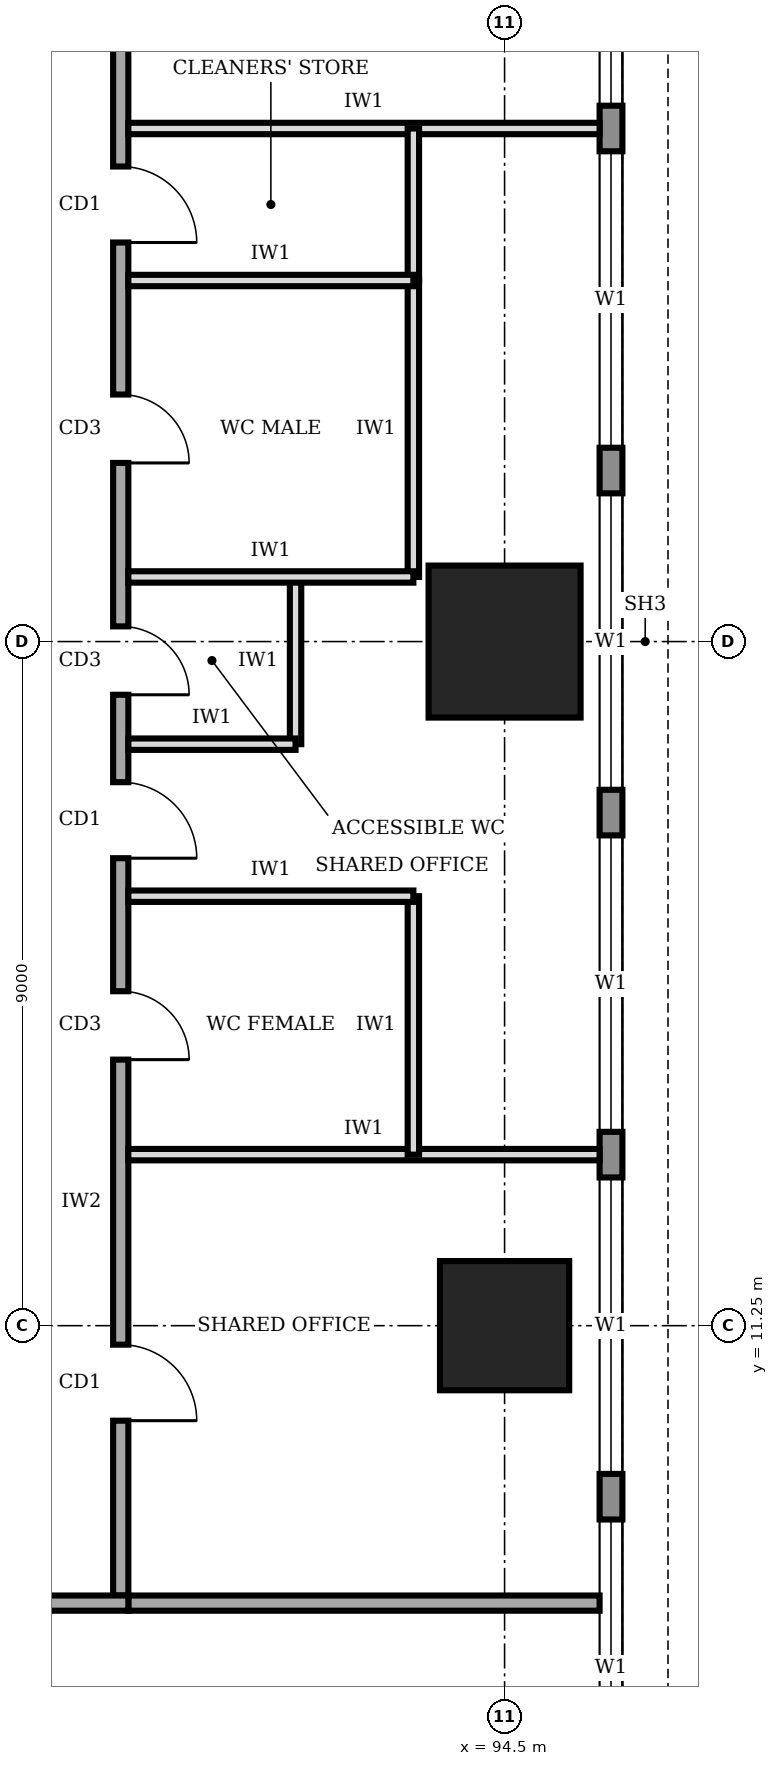
"""IFC4 building model, lengths in metres.
Left out: names, types, materials, properties, quantities, classifications, styles, units other than length and angle.
Written with IfcOpenShell. Run it as: python <this file> out.ifc"""

import sys

from ifc_helpers import new_model, si_unit, direction, frame, frame_2d, origin, origin_2d, place, context, subcontext, project, spatial, rectangle, extrude, element, fill, save


model = new_model("IFC4")
c1 = context("Model", 3, precision=1e-05, world=origin(), true_north=direction((0.0, 1.0)))
c2 = subcontext(c1, "Body", "Model", "MODEL_VIEW")
j1 = project(units=[si_unit("LENGTHUNIT", "METRE"), si_unit("PLANEANGLEUNIT", "RADIAN")], contexts=[c1])
p1 = place(None, origin())
s1 = spatial("IfcSite", under=j1, at=p1, CompositionType="ELEMENT")
p2 = place(p1, origin())
s2 = spatial("IfcBuilding", under=s1, at=p2, CompositionType="ELEMENT")
p3 = place(p2, frame((0.0, 0.0, 213.0)))
s3 = spatial("IfcBuildingStorey", under=s2, at=p3, CompositionType="ELEMENT", Elevation=213.0)
p4 = place(p3, frame((94.5, 11.25, 0.0), z_axis=(0.0, 0.0, 1.0), x_axis=(1.0, 0.0, 0.0)))
e1 = element("IfcColumn", 1, at=p4, inside=s3, PredefinedType="COLUMN", context=c2, shape_type="SweptSolid", body=[
    extrude(rectangle(XDim=1.7, YDim=1.7, at=origin_2d()), origin(), (0.0, 0.0, 1.0), 4.0),
])
p5 = place(p3, frame((94.5, 20.25, 0.0), z_axis=(0.0, 0.0, 1.0), x_axis=(1.0, 0.0, 0.0)))
e2 = element("IfcColumn", 2, at=p5, inside=s3, PredefinedType="COLUMN", context=c2, shape_type="SweptSolid", body=[
    extrude(rectangle(XDim=2.0, YDim=2.0, at=origin_2d()), origin(), (0.0, 0.0, 1.0), 4.0),
])
p6 = place(p3, frame((95.9, 3.32, 0.0), z_axis=(0.0, 0.0, 1.0), x_axis=(0.0, 1.0, 0.0)))
e3 = element("IfcWall", 3, at=p6, inside=s3, PredefinedType="STANDARD", context=c2, shape_type="SweptSolid", body=[
    extrude(rectangle(XDim=33.86, YDim=0.3, at=frame_2d((16.93, 0.0))), origin(), (0.0, 0.0, 1.0), 3.75),
])
p7 = place(p6, frame((1.48, 0.0, 0.9)))
e4 = element("IfcOpeningElement", 4, at=p7, cuts=e3, PredefinedType="OPENING", context=c2, shape_type="SweptSolid", body=[
    extrude(rectangle(XDim=3.9, YDim=2.2, at=frame_2d((1.95, 1.1))), frame((0.0, 0.16, 0.0), z_axis=(0.0, -1.0, 0.0), x_axis=(1.0, 0.0, 0.0)), (0.0, 0.0, 1.0), 0.32),
])
p8 = place(p6, frame((5.98, 0.0, 0.9)))
e5 = element("IfcOpeningElement", 5, at=p8, cuts=e3, PredefinedType="OPENING", context=c2, shape_type="SweptSolid", body=[
    extrude(rectangle(XDim=3.9, YDim=2.2, at=frame_2d((1.95, 1.1))), frame((0.0, 0.16, 0.0), z_axis=(0.0, -1.0, 0.0), x_axis=(1.0, 0.0, 0.0)), (0.0, 0.0, 1.0), 0.32),
])
p9 = place(p6, frame((10.48, 0.0, 0.9)))
e6 = element("IfcOpeningElement", 6, at=p9, cuts=e3, PredefinedType="OPENING", context=c2, shape_type="SweptSolid", body=[
    extrude(rectangle(XDim=3.9, YDim=2.2, at=frame_2d((1.95, 1.1))), frame((0.0, 0.16, 0.0), z_axis=(0.0, -1.0, 0.0), x_axis=(1.0, 0.0, 0.0)), (0.0, 0.0, 1.0), 0.32),
])
p10 = place(p6, frame((14.98, 0.0, 0.9)))
e7 = element("IfcOpeningElement", 7, at=p10, cuts=e3, PredefinedType="OPENING", context=c2, shape_type="SweptSolid", body=[
    extrude(rectangle(XDim=3.9, YDim=2.2, at=frame_2d((1.95, 1.1))), frame((0.0, 0.16, 0.0), z_axis=(0.0, -1.0, 0.0), x_axis=(1.0, 0.0, 0.0)), (0.0, 0.0, 1.0), 0.32),
])
p11 = place(p6, frame((19.48, 0.0, 0.9)))
e8 = element("IfcOpeningElement", 8, at=p11, cuts=e3, PredefinedType="OPENING", context=c2, shape_type="SweptSolid", body=[
    extrude(rectangle(XDim=3.9, YDim=2.2, at=frame_2d((1.95, 1.1))), frame((0.0, 0.16, 0.0), z_axis=(0.0, -1.0, 0.0), x_axis=(1.0, 0.0, 0.0)), (0.0, 0.0, 1.0), 0.32),
])
p12 = place(p6, frame((23.98, 0.0, 0.9)))
e9 = element("IfcOpeningElement", 9, at=p12, cuts=e3, PredefinedType="OPENING", context=c2, shape_type="SweptSolid", body=[
    extrude(rectangle(XDim=3.9, YDim=2.2, at=frame_2d((1.95, 1.1))), frame((0.0, 0.16, 0.0), z_axis=(0.0, -1.0, 0.0), x_axis=(1.0, 0.0, 0.0)), (0.0, 0.0, 1.0), 0.32),
])
p13 = place(p6, frame((28.48, 0.0, 0.9)))
e10 = element("IfcOpeningElement", 10, at=p13, cuts=e3, PredefinedType="OPENING", context=c2, shape_type="SweptSolid", body=[
    extrude(rectangle(XDim=3.9, YDim=2.2, at=frame_2d((1.95, 1.1))), frame((0.0, 0.16, 0.0), z_axis=(0.0, -1.0, 0.0), x_axis=(1.0, 0.0, 0.0)), (0.0, 0.0, 1.0), 0.32),
])
p14 = place(p3, frame((72.65, 7.6, 0.0), z_axis=(0.0, 0.0, 1.0), x_axis=(1.0, 0.0, 0.0)))
e11 = element("IfcWall", 11, at=p14, inside=s3, PredefinedType="SOLIDWALL", context=c2, shape_type="SweptSolid", body=[
    extrude(rectangle(XDim=16.9, YDim=0.2, at=frame_2d((8.45, 0.0))), origin(), (0.0, 0.0, 1.0), 3.75),
])
p15 = place(p14, frame((7.45, 0.0, 0.0)))
e12 = element("IfcOpeningElement", 12, at=p15, cuts=e11, PredefinedType="OPENING", context=c2, shape_type="SweptSolid", body=[
    extrude(rectangle(XDim=1.8, YDim=2.1, at=frame_2d((0.9, 1.05))), frame((0.0, 0.11, 0.0), z_axis=(0.0, -1.0, 0.0), x_axis=(1.0, 0.0, 0.0)), (0.0, 0.0, 1.0), 0.22),
])
p16 = place(p3, frame((89.45, 7.7, 0.0), z_axis=(0.0, 0.0, 1.0), x_axis=(0.0, 1.0, 0.0)))
e13 = element("IfcWall", 13, at=p16, inside=s3, PredefinedType="SOLIDWALL", context=c2, shape_type="SweptSolid", body=[
    extrude(rectangle(XDim=23.8, YDim=0.2, at=frame_2d((11.9, 0.0))), origin(), (0.0, 0.0, 1.0), 3.75),
])
p17 = place(p16, frame((2.3, 0.0, 0.0)))
e14 = element("IfcOpeningElement", 14, at=p17, cuts=e13, PredefinedType="OPENING", context=c2, shape_type="SweptSolid", body=[
    extrude(rectangle(XDim=1.0, YDim=2.1, at=frame_2d((0.5, 1.05))), frame((0.0, 0.11, 0.0), z_axis=(0.0, -1.0, 0.0), x_axis=(1.0, 0.0, 0.0)), (0.0, 0.0, 1.0), 0.22),
])
p18 = place(p16, frame((7.05, 0.0, 0.0)))
e15 = element("IfcOpeningElement", 15, at=p18, cuts=e13, PredefinedType="OPENING", context=c2, shape_type="SweptSolid", body=[
    extrude(rectangle(XDim=0.9, YDim=2.1, at=frame_2d((0.45, 1.05))), frame((0.0, 0.11, 0.0), z_axis=(0.0, -1.0, 0.0), x_axis=(1.0, 0.0, 0.0)), (0.0, 0.0, 1.0), 0.22),
])
p19 = place(p16, frame((11.85, 0.0, 0.0)))
e16 = element("IfcOpeningElement", 16, at=p19, cuts=e13, PredefinedType="OPENING", context=c2, shape_type="SweptSolid", body=[
    extrude(rectangle(XDim=0.9, YDim=2.1, at=frame_2d((0.45, 1.05))), frame((0.0, 0.11, 0.0), z_axis=(0.0, -1.0, 0.0), x_axis=(1.0, 0.0, 0.0)), (0.0, 0.0, 1.0), 0.22),
])
p20 = place(p16, frame((14.9, 0.0, 0.0)))
e17 = element("IfcOpeningElement", 17, at=p20, cuts=e13, PredefinedType="OPENING", context=c2, shape_type="SweptSolid", body=[
    extrude(rectangle(XDim=0.9, YDim=2.1, at=frame_2d((0.45, 1.05))), frame((0.0, 0.11, 0.0), z_axis=(0.0, -1.0, 0.0), x_axis=(1.0, 0.0, 0.0)), (0.0, 0.0, 1.0), 0.22),
])
p21 = place(p16, frame((17.8, 0.0, 0.0)))
e18 = element("IfcOpeningElement", 18, at=p21, cuts=e13, PredefinedType="OPENING", context=c2, shape_type="SweptSolid", body=[
    extrude(rectangle(XDim=1.0, YDim=2.1, at=frame_2d((0.5, 1.05))), frame((0.0, 0.11, 0.0), z_axis=(0.0, -1.0, 0.0), x_axis=(1.0, 0.0, 0.0)), (0.0, 0.0, 1.0), 0.22),
])
p22 = place(p16, frame((9.7, 0.0, 0.0)))
e19 = element("IfcOpeningElement", 19, at=p22, cuts=e13, PredefinedType="OPENING", context=c2, shape_type="SweptSolid", body=[
    extrude(rectangle(XDim=1.0, YDim=2.1, at=frame_2d((0.5, 1.05))), frame((0.0, 0.11, 0.0), z_axis=(0.0, -1.0, 0.0), x_axis=(1.0, 0.0, 0.0)), (0.0, 0.0, 1.0), 0.22),
])
p23 = place(p16, frame((21.05, 0.0, 0.0)))
e20 = element("IfcOpeningElement", 20, at=p23, cuts=e13, PredefinedType="OPENING", context=c2, shape_type="SweptSolid", body=[
    extrude(rectangle(XDim=1.0, YDim=2.1, at=frame_2d((0.5, 1.05))), frame((0.0, 0.11, 0.0), z_axis=(0.0, -1.0, 0.0), x_axis=(1.0, 0.0, 0.0)), (0.0, 0.0, 1.0), 0.22),
])
p24 = place(p3, frame((89.55, 7.6, 0.0), z_axis=(0.0, 0.0, 1.0), x_axis=(1.0, 0.0, 0.0)))
e21 = element("IfcWall", 21, at=p24, inside=s3, PredefinedType="SOLIDWALL", context=c2, shape_type="SweptSolid", body=[
    extrude(rectangle(XDim=6.2, YDim=0.2, at=frame_2d((3.1, 0.0))), origin(), (0.0, 0.0, 1.0), 3.75),
])
for number, where, z_axis, x_axis in (
    (22, (89.55, 13.5, 0.0), (0.0, 0.0, 1.0), (1.0, 0.0, 0.0)),
    (23, (89.55, 27.0, 0.0), (0.0, 0.0, 1.0), (1.0, 0.0, 0.0)),
):
    element("IfcWall", number, at=place(p3, frame(where, z_axis=z_axis, x_axis=x_axis)), inside=s3, PredefinedType="PARTITIONING", context=c2, shape_type="SweptSolid", body=[
        extrude(rectangle(XDim=6.2, YDim=0.15, at=frame_2d((3.1, 0.0))), origin(), (0.0, 0.0, 1.0), 3.75),
    ])
p25 = place(p3, frame((89.55, 16.9, 0.0), z_axis=(0.0, 0.0, 1.0), x_axis=(1.0, 0.0, 0.0)))
e24 = element("IfcWall", 24, at=p25, inside=s3, PredefinedType="PARTITIONING", context=c2, shape_type="SweptSolid", body=[
    extrude(rectangle(XDim=3.75, YDim=0.15, at=frame_2d((1.875, 0.0))), origin(), (0.0, 0.0, 1.0), 3.75),
])
p26 = place(p3, frame((89.55, 18.9, 0.0), z_axis=(0.0, 0.0, 1.0), x_axis=(1.0, 0.0, 0.0)))
e25 = element("IfcWall", 25, at=p26, inside=s3, PredefinedType="PARTITIONING", context=c2, shape_type="SweptSolid", body=[
    extrude(rectangle(XDim=2.2, YDim=0.15, at=frame_2d((1.1, 0.0))), origin(), (0.0, 0.0, 1.0), 3.75),
])
p27 = place(p3, frame((89.55, 21.1, 0.0), z_axis=(0.0, 0.0, 1.0), x_axis=(1.0, 0.0, 0.0)))
e26 = element("IfcWall", 26, at=p27, inside=s3, PredefinedType="PARTITIONING", context=c2, shape_type="SweptSolid", body=[
    extrude(rectangle(XDim=3.75, YDim=0.15, at=frame_2d((1.875, 0.0))), origin(), (0.0, 0.0, 1.0), 2.85),
])
p28 = place(p3, frame((89.55, 25.0, 0.0), z_axis=(0.0, 0.0, 1.0), x_axis=(1.0, 0.0, 0.0)))
e27 = element("IfcWall", 27, at=p28, inside=s3, PredefinedType="PARTITIONING", context=c2, shape_type="SweptSolid", body=[
    extrude(rectangle(XDim=3.75, YDim=0.15, at=frame_2d((1.875, 0.0))), origin(), (0.0, 0.0, 1.0), 3.75),
])
p29 = place(p3, frame((93.3, 13.5, 0.0), z_axis=(0.0, 0.0, 1.0), x_axis=(0.0, 1.0, 0.0)))
e28 = element("IfcWall", 28, at=p29, inside=s3, PredefinedType="PARTITIONING", context=c2, shape_type="SweptSolid", body=[
    extrude(rectangle(XDim=3.4, YDim=0.15, at=frame_2d((1.7, 0.0))), origin(), (0.0, 0.0, 1.0), 3.75),
])
p30 = place(p3, frame((91.75, 18.9, 0.0), z_axis=(0.0, 0.0, 1.0), x_axis=(0.0, 1.0, 0.0)))
e29 = element("IfcWall", 29, at=p30, inside=s3, PredefinedType="PARTITIONING", context=c2, shape_type="SweptSolid", body=[
    extrude(rectangle(XDim=2.2, YDim=0.15, at=frame_2d((1.1, 0.0))), origin(), (0.0, 0.0, 1.0), 3.75),
])
p31 = place(p3, frame((93.3, 21.1, 0.0), z_axis=(0.0, 0.0, 1.0), x_axis=(0.0, 1.0, 0.0)))
e30 = element("IfcWall", 30, at=p31, inside=s3, PredefinedType="PARTITIONING", context=c2, shape_type="SweptSolid", body=[
    extrude(rectangle(XDim=3.9, YDim=0.15, at=frame_2d((1.95, 0.0))), origin(), (0.0, 0.0, 1.0), 3.75),
])
p32 = place(p3, frame((93.3, 25.0, 0.0), z_axis=(0.0, 0.0, 1.0), x_axis=(0.0, 1.0, 0.0)))
e31 = element("IfcWall", 31, at=p32, inside=s3, PredefinedType="PARTITIONING", context=c2, shape_type="SweptSolid", body=[
    extrude(rectangle(XDim=2.0, YDim=0.15, at=frame_2d((1.0, 0.0))), origin(), (0.0, 0.0, 1.0), 3.75),
])
p33 = place(p7, origin())
e32 = element("IfcWindow", 32, at=p33, inside=s3, PartitioningType="SINGLE_PANEL", PredefinedType="WINDOW", context=c2, shape_type="SweptSolid", body=[
    extrude(rectangle(XDim=3.9, YDim=2.2, at=frame_2d((1.95, 1.1))), frame((0.0, 0.03, 0.0), z_axis=(0.0, -1.0, 0.0), x_axis=(1.0, 0.0, 0.0)), (0.0, 0.0, 1.0), 0.06),
])
fill(e4, e32)
p34 = place(p8, origin())
e33 = element("IfcWindow", 33, at=p34, inside=s3, PartitioningType="SINGLE_PANEL", PredefinedType="WINDOW", context=c2, shape_type="SweptSolid", body=[
    extrude(rectangle(XDim=3.9, YDim=2.2, at=frame_2d((1.95, 1.1))), frame((0.0, 0.03, 0.0), z_axis=(0.0, -1.0, 0.0), x_axis=(1.0, 0.0, 0.0)), (0.0, 0.0, 1.0), 0.06),
])
fill(e5, e33)
p35 = place(p9, origin())
e34 = element("IfcWindow", 34, at=p35, inside=s3, PartitioningType="SINGLE_PANEL", PredefinedType="WINDOW", context=c2, shape_type="SweptSolid", body=[
    extrude(rectangle(XDim=3.9, YDim=2.2, at=frame_2d((1.95, 1.1))), frame((0.0, 0.03, 0.0), z_axis=(0.0, -1.0, 0.0), x_axis=(1.0, 0.0, 0.0)), (0.0, 0.0, 1.0), 0.06),
])
fill(e6, e34)
p36 = place(p10, origin())
e35 = element("IfcWindow", 35, at=p36, inside=s3, PartitioningType="SINGLE_PANEL", PredefinedType="WINDOW", context=c2, shape_type="SweptSolid", body=[
    extrude(rectangle(XDim=3.9, YDim=2.2, at=frame_2d((1.95, 1.1))), frame((0.0, 0.03, 0.0), z_axis=(0.0, -1.0, 0.0), x_axis=(1.0, 0.0, 0.0)), (0.0, 0.0, 1.0), 0.06),
])
fill(e7, e35)
p37 = place(p11, origin())
e36 = element("IfcWindow", 36, at=p37, inside=s3, PartitioningType="SINGLE_PANEL", PredefinedType="WINDOW", context=c2, shape_type="SweptSolid", body=[
    extrude(rectangle(XDim=3.9, YDim=2.2, at=frame_2d((1.95, 1.1))), frame((0.0, 0.03, 0.0), z_axis=(0.0, -1.0, 0.0), x_axis=(1.0, 0.0, 0.0)), (0.0, 0.0, 1.0), 0.06),
])
fill(e8, e36)
p38 = place(p12, origin())
e37 = element("IfcWindow", 37, at=p38, inside=s3, PartitioningType="SINGLE_PANEL", PredefinedType="WINDOW", context=c2, shape_type="SweptSolid", body=[
    extrude(rectangle(XDim=3.9, YDim=2.2, at=frame_2d((1.95, 1.1))), frame((0.0, 0.03, 0.0), z_axis=(0.0, -1.0, 0.0), x_axis=(1.0, 0.0, 0.0)), (0.0, 0.0, 1.0), 0.06),
])
fill(e9, e37)
p39 = place(p17, frame((1.0, 0.0, 0.0), z_axis=(0.0, 0.0, 1.0), x_axis=(-1.0, 0.0, 0.0)))
e38 = element("IfcDoor", 38, at=p39, inside=s3, OperationType="SINGLE_SWING_RIGHT", PredefinedType="DOOR", context=c2, shape_type="SweptSolid", body=[
    extrude(rectangle(XDim=1.0, YDim=2.1, at=frame_2d((0.5, 1.05))), frame((0.0, 0.025, 0.0), z_axis=(0.0, -1.0, 0.0), x_axis=(1.0, 0.0, 0.0)), (0.0, 0.0, 1.0), 0.05),
])
fill(e14, e38)
p40 = place(p18, frame((0.9, 0.0, 0.0), z_axis=(0.0, 0.0, 1.0), x_axis=(-1.0, 0.0, 0.0)))
e39 = element("IfcDoor", 39, at=p40, inside=s3, OperationType="SINGLE_SWING_RIGHT", PredefinedType="DOOR", context=c2, shape_type="SweptSolid", body=[
    extrude(rectangle(XDim=0.9, YDim=2.1, at=frame_2d((0.45, 1.05))), frame((0.0, 0.025, 0.0), z_axis=(0.0, -1.0, 0.0), x_axis=(1.0, 0.0, 0.0)), (0.0, 0.0, 1.0), 0.05),
])
fill(e15, e39)
p41 = place(p19, frame((0.9, 0.0, 0.0), z_axis=(0.0, 0.0, 1.0), x_axis=(-1.0, 0.0, 0.0)))
e40 = element("IfcDoor", 40, at=p41, inside=s3, OperationType="SINGLE_SWING_RIGHT", PredefinedType="DOOR", context=c2, shape_type="SweptSolid", body=[
    extrude(rectangle(XDim=0.9, YDim=2.1, at=frame_2d((0.45, 1.05))), frame((0.0, 0.025, 0.0), z_axis=(0.0, -1.0, 0.0), x_axis=(1.0, 0.0, 0.0)), (0.0, 0.0, 1.0), 0.05),
])
fill(e16, e40)
p42 = place(p20, frame((0.9, 0.0, 0.0), z_axis=(0.0, 0.0, 1.0), x_axis=(-1.0, 0.0, 0.0)))
e41 = element("IfcDoor", 41, at=p42, inside=s3, OperationType="SINGLE_SWING_RIGHT", PredefinedType="DOOR", context=c2, shape_type="SweptSolid", body=[
    extrude(rectangle(XDim=0.9, YDim=2.1, at=frame_2d((0.45, 1.05))), frame((0.0, 0.025, 0.0), z_axis=(0.0, -1.0, 0.0), x_axis=(1.0, 0.0, 0.0)), (0.0, 0.0, 1.0), 0.05),
])
fill(e17, e41)
p43 = place(p21, frame((1.0, 0.0, 0.0), z_axis=(0.0, 0.0, 1.0), x_axis=(-1.0, 0.0, 0.0)))
e42 = element("IfcDoor", 42, at=p43, inside=s3, OperationType="SINGLE_SWING_RIGHT", PredefinedType="DOOR", context=c2, shape_type="SweptSolid", body=[
    extrude(rectangle(XDim=1.0, YDim=2.1, at=frame_2d((0.5, 1.05))), frame((0.0, 0.025, 0.0), z_axis=(0.0, -1.0, 0.0), x_axis=(1.0, 0.0, 0.0)), (0.0, 0.0, 1.0), 0.05),
])
fill(e18, e42)
p44 = place(p22, frame((1.0, 0.0, 0.0), z_axis=(0.0, 0.0, 1.0), x_axis=(-1.0, 0.0, 0.0)))
e43 = element("IfcDoor", 43, at=p44, inside=s3, OperationType="SINGLE_SWING_RIGHT", PredefinedType="DOOR", context=c2, shape_type="SweptSolid", body=[
    extrude(rectangle(XDim=1.0, YDim=2.1, at=frame_2d((0.5, 1.05))), frame((0.0, 0.025, 0.0), z_axis=(0.0, -1.0, 0.0), x_axis=(1.0, 0.0, 0.0)), (0.0, 0.0, 1.0), 0.05),
])
fill(e19, e43)
save(model, sys.argv[1])
